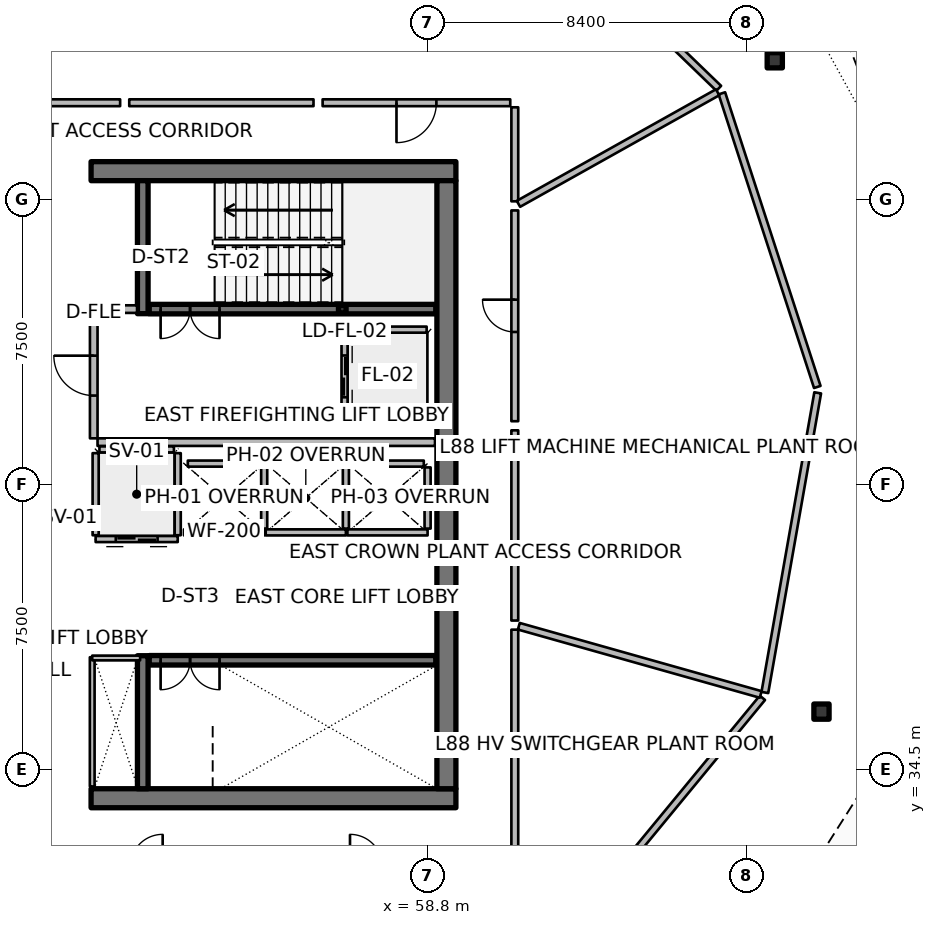
"""IFC4 building model, lengths in metres.
Left out: names, types, materials, properties, quantities, classifications, styles, units other than length and angle.
Written with IfcOpenShell. Run it as: python <this file> out.ifc"""

import sys

from ifc_helpers import new_model, si_unit, direction, frame, frame_2d, origin, origin_2d, place, context, subcontext, project, spatial, rectangle, hollow_rectangle, extrude, element, fill, save


model = new_model("IFC4")
c1 = context("Model", 3, precision=1e-05, world=origin(), true_north=direction((0.0, 1.0)))
c2 = subcontext(c1, "Body", "Model", "MODEL_VIEW")
j1 = project(units=[si_unit("LENGTHUNIT", "METRE"), si_unit("PLANEANGLEUNIT", "RADIAN")], contexts=[c1])
p1 = place(None, origin())
s1 = spatial("IfcSite", under=j1, at=p1, CompositionType="ELEMENT")
p2 = place(p1, origin())
s2 = spatial("IfcBuilding", under=s1, at=p2, CompositionType="ELEMENT")
p3 = place(p2, frame((0.0, 0.0, 351.5)))
s3 = spatial("IfcBuildingStorey", under=s2, at=p3, CompositionType="ELEMENT", Elevation=351.5)
for number, where, z_axis, x_axis in (
    (1, (49.95, 33.75, 0.0), (0.0, 0.0, 1.0), (1.0, 0.0, 0.0)),
    (2, (49.95, 50.25, 0.0), (0.0, 0.0, 1.0), (1.0, 0.0, 0.0)),
):
    element("IfcWall", number, at=place(p3, frame(where, z_axis=z_axis, x_axis=x_axis)), inside=s3, PredefinedType="SHEAR", context=c2, shape_type="SweptSolid", body=[
        extrude(rectangle(XDim=9.6, YDim=0.5, at=frame_2d((4.8, 0.0))), origin(), (0.0, 0.0, 1.0), 4.5),
    ])
p4 = place(p3, frame((59.3, 34.0, 0.0), z_axis=(0.0, 0.0, 1.0), x_axis=(0.0, 1.0, 0.0)))
e3 = element("IfcWall", 3, at=p4, inside=s3, PredefinedType="SHEAR", context=c2, shape_type="SweptSolid", body=[
    extrude(rectangle(XDim=16.0, YDim=0.5, at=frame_2d((8.0, 0.0))), origin(), (0.0, 0.0, 1.0), 4.5),
])
for number, where, z_axis, x_axis in (
    (4, (51.31, 46.5, 0.0), (0.0, 0.0, 1.0), (0.0, 1.0, 0.0)),
    (5, (51.31, 34.0, 0.0), (0.0, 0.0, 1.0), (0.0, 1.0, 0.0)),
):
    element("IfcWall", number, at=place(p3, frame(where, z_axis=z_axis, x_axis=x_axis)), inside=s3, PredefinedType="SHEAR", context=c2, shape_type="SweptSolid", body=[
        extrude(rectangle(XDim=3.5, YDim=0.28, at=frame_2d((1.75, 0.0))), origin(), (0.0, 0.0, 1.0), 4.5),
    ])
p5 = place(p3, frame((56.56, 46.62, 0.0), z_axis=(0.0, 0.0, 1.0), x_axis=(1.0, 0.0, 0.0)))
e6 = element("IfcColumn", 6, at=p5, inside=s3, PredefinedType="COLUMN", context=c2, shape_type="SweptSolid", body=[
    extrude(hollow_rectangle(XDim=0.2, YDim=0.2, WallThickness=0.01, InnerFilletRadius=0.01, OuterFilletRadius=0.02, at=origin_2d()), origin(), (0.0, 0.0, 1.0), 2.045),
])
for number, where, z_axis, x_axis in (
    (7, (67.941, 53.167, 0.0), (0.0, 0.0, 1.0), (1.0, 0.0, 0.0)),
    (8, (69.17, 36.03, 0.0), (0.0, 0.0, 1.0), (1.0, 0.0, 0.0)),
):
    element("IfcColumn", number, at=place(p3, frame(where, z_axis=z_axis, x_axis=x_axis)), inside=s3, PredefinedType="COLUMN", context=c2, shape_type="SweptSolid", body=[
        extrude(hollow_rectangle(XDim=0.4, YDim=0.4, WallThickness=0.02, InnerFilletRadius=0.02, OuterFilletRadius=0.04, at=origin_2d()), origin(), (0.0, 0.0, 1.0), 4.22),
    ])
p6 = place(p3, frame((51.48, 46.62, 0.0), z_axis=(0.0, 0.0, 1.0), x_axis=(1.0, 0.0, 0.0)))
e9 = element("IfcWall", 9, at=p6, inside=s3, PredefinedType="SOLIDWALL", context=c2, shape_type="SweptSolid", body=[
    extrude(rectangle(XDim=7.54, YDim=0.25, at=frame_2d((3.77, 0.0))), origin(), (0.0, 0.0, 1.0), 4.22),
])
p7 = place(p6, frame((0.3, 0.0, 0.0)))
e10 = element("IfcOpeningElement", 10, at=p7, cuts=e9, PredefinedType="OPENING", context=c2, shape_type="SweptSolid", body=[
    extrude(rectangle(XDim=1.55, YDim=2.15, at=frame_2d((0.775, 1.075))), frame((0.0, 0.135, 0.0), z_axis=(0.0, -1.0, 0.0), x_axis=(1.0, 0.0, 0.0)), (0.0, 0.0, 1.0), 0.27),
])
p8 = place(p3, frame((51.48, 37.38, 0.0), z_axis=(0.0, 0.0, 1.0), x_axis=(1.0, 0.0, 0.0)))
e11 = element("IfcWall", 11, at=p8, inside=s3, PredefinedType="SOLIDWALL", context=c2, shape_type="SweptSolid", body=[
    extrude(rectangle(XDim=7.54, YDim=0.25, at=frame_2d((3.77, 0.0))), origin(), (0.0, 0.0, 1.0), 4.22),
])
p9 = place(p8, frame((0.3, 0.0, 0.0)))
e12 = element("IfcOpeningElement", 12, at=p9, cuts=e11, PredefinedType="OPENING", context=c2, shape_type="SweptSolid", body=[
    extrude(rectangle(XDim=1.55, YDim=2.15, at=frame_2d((0.775, 1.075))), frame((0.0, 0.135, 0.0), z_axis=(0.0, -1.0, 0.0), x_axis=(1.0, 0.0, 0.0)), (0.0, 0.0, 1.0), 0.27),
])
p10 = place(p3, frame((54.505, 40.745, 0.0), z_axis=(0.0, 0.0, 1.0), x_axis=(-1.0, 0.0, 0.0)))
e13 = element("IfcWall", 13, at=p10, inside=s3, PredefinedType="PARTITIONING", context=c2, shape_type="SweptSolid", body=[
    extrude(rectangle(XDim=2.11, YDim=0.16, at=frame_2d((1.055, 0.0))), origin(), (0.0, 0.0, 1.0), 4.22),
])
p11 = place(p3, frame((54.505, 40.845, 0.0), z_axis=(0.0, 0.0, 1.0), x_axis=(0.0, 1.0, 0.0)))
e14 = element("IfcWall", 14, at=p11, inside=s3, PredefinedType="PARTITIONING", context=c2, shape_type="SweptSolid", body=[
    extrude(rectangle(XDim=1.61, YDim=0.16, at=frame_2d((0.805, 0.0))), origin(), (0.0, 0.0, 1.0), 4.22),
])
p12 = place(p3, frame((52.495, 42.555, 0.0), z_axis=(0.0, 0.0, 1.0), x_axis=(1.0, 0.0, 0.0)))
e15 = element("IfcWall", 15, at=p12, inside=s3, PredefinedType="PARTITIONING", context=c2, shape_type="SweptSolid", body=[
    extrude(rectangle(XDim=1.91, YDim=0.16, at=frame_2d((0.955, 0.0))), origin(), (0.0, 0.0, 1.0), 4.22),
])
p13 = place(p3, frame((56.655, 40.745, 0.0), z_axis=(0.0, 0.0, 1.0), x_axis=(-1.0, 0.0, 0.0)))
e16 = element("IfcWall", 16, at=p13, inside=s3, PredefinedType="PARTITIONING", context=c2, shape_type="SweptSolid", body=[
    extrude(rectangle(XDim=2.11, YDim=0.16, at=frame_2d((1.055, 0.0))), origin(), (0.0, 0.0, 1.0), 4.22),
])
p14 = place(p3, frame((56.655, 40.845, 0.0), z_axis=(0.0, 0.0, 1.0), x_axis=(0.0, 1.0, 0.0)))
e17 = element("IfcWall", 17, at=p14, inside=s3, PredefinedType="PARTITIONING", context=c2, shape_type="SweptSolid", body=[
    extrude(rectangle(XDim=1.61, YDim=0.16, at=frame_2d((0.805, 0.0))), origin(), (0.0, 0.0, 1.0), 4.22),
])
p15 = place(p3, frame((54.645, 42.555, 0.0), z_axis=(0.0, 0.0, 1.0), x_axis=(1.0, 0.0, 0.0)))
e18 = element("IfcWall", 18, at=p15, inside=s3, PredefinedType="PARTITIONING", context=c2, shape_type="SweptSolid", body=[
    extrude(rectangle(XDim=1.91, YDim=0.16, at=frame_2d((0.955, 0.0))), origin(), (0.0, 0.0, 1.0), 4.22),
])
p16 = place(p3, frame((58.805, 40.745, 0.0), z_axis=(0.0, 0.0, 1.0), x_axis=(-1.0, 0.0, 0.0)))
e19 = element("IfcWall", 19, at=p16, inside=s3, PredefinedType="PARTITIONING", context=c2, shape_type="SweptSolid", body=[
    extrude(rectangle(XDim=2.11, YDim=0.16, at=frame_2d((1.055, 0.0))), origin(), (0.0, 0.0, 1.0), 4.22),
])
p17 = place(p3, frame((58.805, 40.845, 0.0), z_axis=(0.0, 0.0, 1.0), x_axis=(0.0, 1.0, 0.0)))
e20 = element("IfcWall", 20, at=p17, inside=s3, PredefinedType="PARTITIONING", context=c2, shape_type="SweptSolid", body=[
    extrude(rectangle(XDim=1.61, YDim=0.16, at=frame_2d((0.805, 0.0))), origin(), (0.0, 0.0, 1.0), 4.22),
])
p18 = place(p3, frame((56.795, 42.555, 0.0), z_axis=(0.0, 0.0, 1.0), x_axis=(1.0, 0.0, 0.0)))
e21 = element("IfcWall", 21, at=p18, inside=s3, PredefinedType="PARTITIONING", context=c2, shape_type="SweptSolid", body=[
    extrude(rectangle(XDim=1.91, YDim=0.16, at=frame_2d((0.955, 0.0))), origin(), (0.0, 0.0, 1.0), 4.22),
])
p19 = place(p3, frame((56.62, 46.08, 0.0), z_axis=(0.0, 0.0, 1.0), x_axis=(0.0, -1.0, 0.0)))
e22 = element("IfcWall", 22, at=p19, inside=s3, PredefinedType="PARTITIONING", context=c2, shape_type="SweptSolid", body=[
    extrude(rectangle(XDim=2.46, YDim=0.16, at=frame_2d((1.23, 0.0))), origin(), (0.0, 0.0, 1.0), 4.22),
])
p20 = place(p19, frame((0.68, 0.0, 0.0)))
e23 = element("IfcOpeningElement", 23, at=p20, cuts=e22, PredefinedType="OPENING", context=c2, shape_type="SweptSolid", body=[
    extrude(rectangle(XDim=1.1, YDim=2.1, at=frame_2d((0.55, 1.05))), frame((0.0, 0.09, 0.0), z_axis=(0.0, -1.0, 0.0), x_axis=(1.0, 0.0, 0.0)), (0.0, 0.0, 1.0), 0.18),
])
for number, where, z_axis, x_axis in (
    (24, (56.72, 46.08, 0.0), (0.0, 0.0, 1.0), (1.0, 0.0, 0.0)),
    (25, (56.72, 43.62, 0.0), (0.0, 0.0, 1.0), (1.0, 0.0, 0.0)),
):
    element("IfcWall", number, at=place(p3, frame(where, z_axis=z_axis, x_axis=x_axis)), inside=s3, PredefinedType="PARTITIONING", context=c2, shape_type="SweptSolid", body=[
        extrude(rectangle(XDim=2.06, YDim=0.16, at=frame_2d((1.03, 0.0))), origin(), (0.0, 0.0, 1.0), 4.22),
    ])
p21 = place(p3, frame((52.23, 40.57, 0.0), z_axis=(0.0, 0.0, 1.0), x_axis=(-1.0, 0.0, 0.0)))
e26 = element("IfcWall", 26, at=p21, inside=s3, PredefinedType="PARTITIONING", context=c2, shape_type="SweptSolid", body=[
    extrude(rectangle(XDim=2.16, YDim=0.16, at=frame_2d((1.08, 0.0))), origin(), (0.0, 0.0, 1.0), 4.22),
])
p22 = place(p21, frame((0.53, 0.0, 0.0)))
e27 = element("IfcOpeningElement", 27, at=p22, cuts=e26, PredefinedType="OPENING", context=c2, shape_type="SweptSolid", body=[
    extrude(rectangle(XDim=1.1, YDim=2.1, at=frame_2d((0.55, 1.05))), frame((0.0, 0.09, 0.0), z_axis=(0.0, -1.0, 0.0), x_axis=(1.0, 0.0, 0.0)), (0.0, 0.0, 1.0), 0.18),
])
for number, where, z_axis, x_axis in (
    (28, (52.23, 40.67, 0.0), (0.0, 0.0, 1.0), (0.0, 1.0, 0.0)),
    (29, (50.07, 40.67, 0.0), (0.0, 0.0, 1.0), (0.0, 1.0, 0.0)),
):
    element("IfcWall", number, at=place(p3, frame(where, z_axis=z_axis, x_axis=x_axis)), inside=s3, PredefinedType="PARTITIONING", context=c2, shape_type="SweptSolid", body=[
        extrude(rectangle(XDim=2.16, YDim=0.16, at=frame_2d((1.08, 0.0))), origin(), (0.0, 0.0, 1.0), 4.22),
    ])
p23 = place(p3, frame((50.17, 42.93, 0.0), z_axis=(0.0, 0.0, 1.0), x_axis=(1.0, 0.0, 0.0)))
e30 = element("IfcWall", 30, at=p23, inside=s3, PredefinedType="PARTITIONING", context=c2, shape_type="SweptSolid", body=[
    extrude(rectangle(XDim=1.96, YDim=0.16, at=frame_2d((0.98, 0.0))), origin(), (0.0, 0.0, 1.0), 4.22),
])
p24 = place(p3, frame((50.12, 43.12, 0.0), z_axis=(0.0, 0.0, 1.0), x_axis=(1.0, 0.0, 0.0)))
e31 = element("IfcWall", 31, at=p24, inside=s3, PredefinedType="PARTITIONING", context=c2, shape_type="SweptSolid", body=[
    extrude(rectangle(XDim=8.88, YDim=0.2, at=frame_2d((4.44, 0.0))), origin(), (0.0, 0.0, 1.0), 4.22),
])
p25 = place(p3, frame((50.14, 46.62, 0.0), z_axis=(0.0, 0.0, 1.0), x_axis=(1.0, 0.0, 0.0)))
e32 = element("IfcWall", 32, at=p25, inside=s3, PredefinedType="PARTITIONING", context=c2, shape_type="SweptSolid", body=[
    extrude(rectangle(XDim=1.02, YDim=0.2, at=frame_2d((0.51, 0.0))), origin(), (0.0, 0.0, 1.0), 4.22),
])
p26 = place(p3, frame((50.02, 43.22, 0.0), z_axis=(0.0, 0.0, 1.0), x_axis=(0.0, 1.0, 0.0)))
e33 = element("IfcWall", 33, at=p26, inside=s3, PredefinedType="PARTITIONING", context=c2, shape_type="SweptSolid", body=[
    extrude(rectangle(XDim=3.3, YDim=0.2, at=frame_2d((1.65, 0.0))), origin(), (0.0, 0.0, 1.0), 4.22),
])
p27 = place(p26, frame((1.125, 0.0, 0.0)))
e34 = element("IfcOpeningElement", 34, at=p27, cuts=e33, PredefinedType="OPENING", context=c2, shape_type="SweptSolid", body=[
    extrude(rectangle(XDim=1.05, YDim=2.1, at=frame_2d((0.525, 1.05))), frame((0.0, 0.11, 0.0), z_axis=(0.0, -1.0, 0.0), x_axis=(1.0, 0.0, 0.0)), (0.0, 0.0, 1.0), 0.22),
])
p28 = place(p3, frame((49.98, 34.06, 0.0), z_axis=(0.0, 0.0, 1.0), x_axis=(0.0, 1.0, 0.0)))
e35 = element("IfcWall", 35, at=p28, inside=s3, PredefinedType="PARTITIONING", context=c2, shape_type="SweptSolid", body=[
    extrude(rectangle(XDim=3.4, YDim=0.125, at=frame_2d((1.7, 0.0))), origin(), (0.0, 0.0, 1.0), 3.66),
])
p29 = place(p3, frame((49.98, 37.44, 0.0), z_axis=(0.0, 0.0, 1.0), x_axis=(1.0, 0.0, 0.0)))
e36 = element("IfcWall", 36, at=p29, inside=s3, PredefinedType="PARTITIONING", context=c2, shape_type="SweptSolid", body=[
    extrude(rectangle(XDim=1.26, YDim=0.125, at=frame_2d((0.63, 0.0))), origin(), (0.0, 0.0, 1.0), 3.66),
])
p30 = place(p3, frame((66.467, 52.43, 0.0), z_axis=(0.0, 0.0, 1.0), x_axis=(-0.719364153135, 0.694633151516, 0.0)))
e37 = element("IfcWall", 37, at=p30, inside=s3, PredefinedType="PARTITIONING", context=c2, shape_type="SweptSolid", body=[
    extrude(rectangle(XDim=8.006, YDim=0.18, at=frame_2d((4.003, 0.0))), origin(), (0.0, 0.0, 1.0), 3.213),
])
p31 = place(p3, frame((62.742, 30.48, 0.0), z_axis=(0.0, 0.0, 1.0), x_axis=(0.636018833443, 0.771673534278, 0.0)))
e38 = element("IfcWall", 38, at=p31, inside=s3, PredefinedType="PARTITIONING", context=c2, shape_type="SweptSolid", body=[
    extrude(rectangle(XDim=7.661, YDim=0.18, at=frame_2d((3.831, 0.0))), origin(), (0.0, 0.0, 1.0), 3.213),
])
p32 = place(p3, frame((67.68, 36.532, 0.0), z_axis=(0.0, 0.0, 1.0), x_axis=(0.173668776466, 0.984804120666, 0.0)))
e39 = element("IfcWall", 39, at=p32, inside=s3, PredefinedType="PARTITIONING", context=c2, shape_type="SweptSolid", body=[
    extrude(rectangle(XDim=8.006, YDim=0.18, at=frame_2d((4.003, 0.0))), origin(), (0.0, 0.0, 1.0), 3.213),
])
p33 = place(p3, frame((69.059, 44.572, 0.0), z_axis=(0.0, 0.0, 1.0), x_axis=(-0.309024234991, 0.951054163646, 0.0)))
e40 = element("IfcWall", 40, at=p33, inside=s3, PredefinedType="PARTITIONING", context=c2, shape_type="SweptSolid", body=[
    extrude(rectangle(XDim=8.124, YDim=0.18, at=frame_2d((4.062, 0.0))), origin(), (0.0, 0.0, 1.0), 3.213),
])
p34 = place(p3, frame((61.1, 49.456, 0.0), z_axis=(0.0, 0.0, 1.0), x_axis=(0.0, 1.0, 0.0)))
e41 = element("IfcWall", 41, at=p34, inside=s3, PredefinedType="PARTITIONING", context=c2, shape_type="SweptSolid", body=[
    extrude(rectangle(XDim=2.474, YDim=0.18, at=frame_2d((1.237, 0.0))), origin(), (0.0, 0.0, 1.0), 3.213),
])
p35 = place(p3, frame((60.98, 52.05, 0.0), z_axis=(0.0, 0.0, 1.0), x_axis=(-1.0, 0.0, 0.0)))
e42 = element("IfcWall", 42, at=p35, inside=s3, PredefinedType="PARTITIONING", context=c2, shape_type="SweptSolid", body=[
    extrude(rectangle(XDim=4.937, YDim=0.18, at=frame_2d((2.469, 0.0))), origin(), (0.0, 0.0, 1.0), 3.213),
])
p36 = place(p35, frame((1.944, 0.0, 0.0)))
e43 = element("IfcOpeningElement", 43, at=p36, cuts=e42, PredefinedType="OPENING", context=c2, shape_type="SweptSolid", body=[
    extrude(rectangle(XDim=1.05, YDim=2.1, at=frame_2d((0.525, 1.05))), frame((0.0, 0.1, 0.0), z_axis=(0.0, -1.0, 0.0), x_axis=(1.0, 0.0, 0.0)), (0.0, 0.0, 1.0), 0.2),
])
p37 = place(p3, frame((55.803, 52.05, 0.0), z_axis=(0.0, 0.0, 1.0), x_axis=(-1.0, 0.0, 0.0)))
e44 = element("IfcWall", 44, at=p37, inside=s3, PredefinedType="PARTITIONING", context=c2, shape_type="SweptSolid", body=[
    extrude(rectangle(XDim=4.848, YDim=0.18, at=frame_2d((2.424, 0.0))), origin(), (0.0, 0.0, 1.0), 3.213),
])
p38 = place(p3, frame((50.714, 52.05, 0.0), z_axis=(0.0, 0.0, 1.0), x_axis=(-1.0, 0.0, 0.0)))
e45 = element("IfcWall", 45, at=p38, inside=s3, PredefinedType="PARTITIONING", context=c2, shape_type="SweptSolid", body=[
    extrude(rectangle(XDim=3.784, YDim=0.18, at=frame_2d((1.892, 0.0))), origin(), (0.0, 0.0, 1.0), 3.213),
])
p39 = place(p3, frame((61.196, 49.39, 0.0), z_axis=(0.0, 0.0, 1.0), x_axis=(0.87249769897, 0.488618220385, 0.0)))
e46 = element("IfcWall", 46, at=p39, inside=s3, PredefinedType="PARTITIONING", context=c2, shape_type="SweptSolid", body=[
    extrude(rectangle(XDim=6.007, YDim=0.18, at=frame_2d((3.003, 0.0))), origin(), (0.0, 0.0, 1.0), 3.213),
])
p40 = place(p3, frame((61.1, 32.07, 0.0), z_axis=(0.0, 0.0, 1.0), x_axis=(0.0, 1.0, 0.0)))
e47 = element("IfcWall", 47, at=p40, inside=s3, PredefinedType="PARTITIONING", context=c2, shape_type="SweptSolid", body=[
    extrude(rectangle(XDim=6.115, YDim=0.18, at=frame_2d((3.058, 0.0))), origin(), (0.0, 0.0, 1.0), 3.213),
])
p41 = place(p3, frame((61.206, 38.275, 0.0), z_axis=(0.0, 0.0, 1.0), x_axis=(0.962461547865, -0.271418070294, 0.0)))
e48 = element("IfcWall", 48, at=p41, inside=s3, PredefinedType="PARTITIONING", context=c2, shape_type="SweptSolid", body=[
    extrude(rectangle(XDim=6.612, YDim=0.18, at=frame_2d((3.306, 0.0))), origin(), (0.0, 0.0, 1.0), 3.213),
])
p42 = place(p3, frame((61.1, 38.425, 0.0), z_axis=(0.0, 0.0, 1.0), x_axis=(0.0, 1.0, 0.0)))
e49 = element("IfcWall", 49, at=p42, inside=s3, PredefinedType="PARTITIONING", context=c2, shape_type="SweptSolid", body=[
    extrude(rectangle(XDim=5.005, YDim=0.18, at=frame_2d((2.502, 0.0))), origin(), (0.0, 0.0, 1.0), 3.213),
])
p43 = place(p3, frame((61.1, 43.67, 0.0), z_axis=(0.0, 0.0, 1.0), x_axis=(0.0, 1.0, 0.0)))
e50 = element("IfcWall", 50, at=p43, inside=s3, PredefinedType="PARTITIONING", context=c2, shape_type="SweptSolid", body=[
    extrude(rectangle(XDim=5.546, YDim=0.18, at=frame_2d((2.773, 0.0))), origin(), (0.0, 0.0, 1.0), 3.213),
])
p44 = place(p43, frame((2.348, 0.0, 0.0)))
e51 = element("IfcOpeningElement", 51, at=p44, cuts=e50, PredefinedType="OPENING", context=c2, shape_type="SweptSolid", body=[
    extrude(rectangle(XDim=0.85, YDim=2.06, at=frame_2d((0.425, 1.03))), frame((0.0, 0.1, 0.0), z_axis=(0.0, -1.0, 0.0), x_axis=(1.0, 0.0, 0.0)), (0.0, 0.0, 1.0), 0.2),
])
p45 = place(p7, origin())
e52 = element("IfcDoor", 52, at=p45, inside=s3, OperationType="DOUBLE_DOOR_SINGLE_SWING", PredefinedType="DOOR", context=c2, shape_type="SweptSolid", body=[
    extrude(rectangle(XDim=1.55, YDim=2.15, at=frame_2d((0.775, 1.075))), frame((0.0, 0.025, 0.0), z_axis=(0.0, -1.0, 0.0), x_axis=(1.0, 0.0, 0.0)), (0.0, 0.0, 1.0), 0.05),
])
fill(e10, e52)
p46 = place(p9, origin())
e53 = element("IfcDoor", 53, at=p46, inside=s3, OperationType="DOUBLE_DOOR_SINGLE_SWING", PredefinedType="DOOR", context=c2, shape_type="SweptSolid", body=[
    extrude(rectangle(XDim=1.55, YDim=2.15, at=frame_2d((0.775, 1.075))), frame((0.0, 0.025, 0.0), z_axis=(0.0, -1.0, 0.0), x_axis=(1.0, 0.0, 0.0)), (0.0, 0.0, 1.0), 0.05),
])
fill(e12, e53)
p47 = place(p20, origin())
e54 = element("IfcDoor", 54, at=p47, inside=s3, OperationType="DOUBLE_DOOR_SLIDING", PredefinedType="DOOR", context=c2, shape_type="SweptSolid", body=[
    extrude(rectangle(XDim=1.1, YDim=2.1, at=frame_2d((0.55, 1.05))), frame((0.0, 0.025, 0.0), z_axis=(0.0, -1.0, 0.0), x_axis=(1.0, 0.0, 0.0)), (0.0, 0.0, 1.0), 0.05),
])
fill(e23, e54)
p48 = place(p22, origin())
e55 = element("IfcDoor", 55, at=p48, inside=s3, OperationType="DOUBLE_DOOR_SLIDING", PredefinedType="DOOR", context=c2, shape_type="SweptSolid", body=[
    extrude(rectangle(XDim=1.1, YDim=2.1, at=frame_2d((0.55, 1.05))), frame((0.0, 0.025, 0.0), z_axis=(0.0, -1.0, 0.0), x_axis=(1.0, 0.0, 0.0)), (0.0, 0.0, 1.0), 0.05),
])
fill(e27, e55)
p49 = place(p27, origin())
e56 = element("IfcDoor", 56, at=p49, inside=s3, OperationType="SINGLE_SWING_RIGHT", PredefinedType="DOOR", context=c2, shape_type="SweptSolid", body=[
    extrude(rectangle(XDim=1.05, YDim=2.1, at=frame_2d((0.525, 1.05))), frame((0.0, 0.025, 0.0), z_axis=(0.0, -1.0, 0.0), x_axis=(1.0, 0.0, 0.0)), (0.0, 0.0, 1.0), 0.05),
])
fill(e34, e56)
p50 = place(p36, origin())
e57 = element("IfcDoor", 57, at=p50, inside=s3, OperationType="SINGLE_SWING_RIGHT", PredefinedType="DOOR", context=c2, shape_type="SweptSolid", body=[
    extrude(rectangle(XDim=1.05, YDim=2.1, at=frame_2d((0.525, 1.05))), frame((0.0, 0.025, 0.0), z_axis=(0.0, -1.0, 0.0), x_axis=(1.0, 0.0, 0.0)), (0.0, 0.0, 1.0), 0.05),
])
fill(e43, e57)
p51 = place(p44, origin())
e58 = element("IfcDoor", 58, at=p51, inside=s3, OperationType="SINGLE_SWING_RIGHT", PredefinedType="DOOR", context=c2, shape_type="SweptSolid", body=[
    extrude(rectangle(XDim=0.85, YDim=2.06, at=frame_2d((0.425, 1.03))), frame((0.0, 0.025, 0.0), z_axis=(0.0, -1.0, 0.0), x_axis=(1.0, 0.0, 0.0)), (0.0, 0.0, 1.0), 0.05),
])
fill(e51, e58)
save(model, sys.argv[1])
